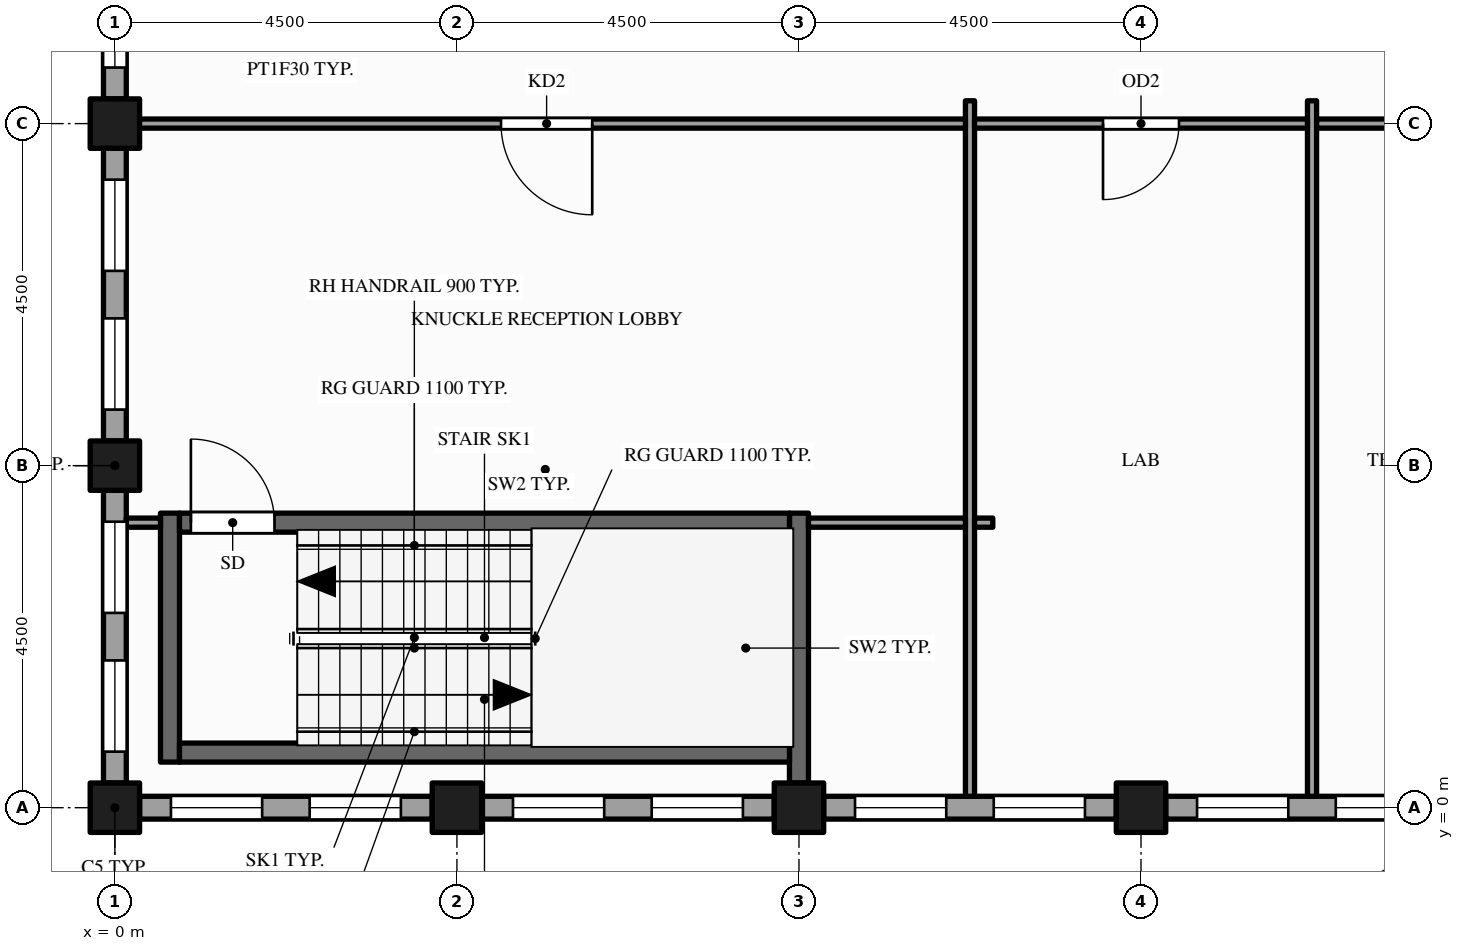
"""IFC4 building model, lengths in metres.
Left out: names, types, materials, properties, quantities, classifications, styles, units other than length and angle.
Written with IfcOpenShell. Run it as: python <this file> out.ifc"""

import sys

from ifc_helpers import new_model, si_unit, direction, frame, frame_2d, origin, origin_2d, place, context, subcontext, project, spatial, rectangle, hollow_rectangle, extrude, element, fill, save


model = new_model("IFC4")
c1 = context("Model", 3, precision=1e-05, world=origin(), true_north=direction((0.0, 1.0)))
c2 = subcontext(c1, "Body", "Model", "MODEL_VIEW")
j1 = project(units=[si_unit("LENGTHUNIT", "METRE"), si_unit("PLANEANGLEUNIT", "RADIAN")], contexts=[c1])
p1 = place(None, origin())
s1 = spatial("IfcSite", under=j1, at=p1, CompositionType="ELEMENT")
p2 = place(p1, origin())
s2 = spatial("IfcBuilding", under=s1, at=p2, CompositionType="ELEMENT")
p3 = place(p2, frame((0.0, 0.0, 293.0)))
s3 = spatial("IfcBuildingStorey", under=s2, at=p3, CompositionType="ELEMENT", Elevation=293.0)
for number, where, z_axis, x_axis in (
    (1, (0.0, 0.0, -0.15), (0.0, 0.0, 1.0), (1.0, 0.0, 0.0)),
    (2, (0.0, 4.5, -0.15), (0.0, 0.0, 1.0), (1.0, 0.0, 0.0)),
    (3, (0.0, 9.0, -0.15), (0.0, 0.0, 1.0), (1.0, 0.0, 0.0)),
    (4, (4.5, 0.0, -0.15), (0.0, 0.0, 1.0), (1.0, 0.0, 0.0)),
    (5, (9.0, 0.0, -0.15), (0.0, 0.0, 1.0), (1.0, 0.0, 0.0)),
    (6, (13.5, 0.0, -0.15), (0.0, 0.0, 1.0), (1.0, 0.0, 0.0)),
):
    element("IfcColumn", number, at=place(p3, frame(where, z_axis=z_axis, x_axis=x_axis)), inside=s3, PredefinedType="COLUMN", context=c2, shape_type="SweptSolid", body=[
        extrude(hollow_rectangle(XDim=0.65, YDim=0.65, WallThickness=0.032, at=origin_2d()), origin(), (0.0, 0.0, 1.0), 3.9),
    ])
p4 = place(p3, frame((0.0, 13.175, 0.0), z_axis=(0.0, 0.0, 1.0), x_axis=(0.0, -1.0, 0.0)))
e7 = element("IfcWall", 7, at=p4, inside=s3, PredefinedType="STANDARD", context=c2, shape_type="SweptSolid", body=[
    extrude(rectangle(XDim=3.85, YDim=0.3, at=frame_2d((1.925, 0.0))), origin(), (0.0, 0.0, 1.0), 3.062),
])
p5 = place(p4, frame((0.413, 0.0, 0.9)))
e8 = element("IfcOpeningElement", 8, at=p5, cuts=e7, PredefinedType="OPENING", context=c2, shape_type="SweptSolid", body=[
    extrude(rectangle(XDim=1.2, YDim=2.0, at=frame_2d((0.6, 1.0))), frame((0.0, 0.16, 0.0), z_axis=(0.0, -1.0, 0.0), x_axis=(1.0, 0.0, 0.0)), (0.0, 0.0, 1.0), 0.32),
])
p6 = place(p4, frame((2.238, 0.0, 0.9)))
e9 = element("IfcOpeningElement", 9, at=p6, cuts=e7, PredefinedType="OPENING", context=c2, shape_type="SweptSolid", body=[
    extrude(rectangle(XDim=1.2, YDim=2.0, at=frame_2d((0.6, 1.0))), frame((0.0, 0.16, 0.0), z_axis=(0.0, -1.0, 0.0), x_axis=(1.0, 0.0, 0.0)), (0.0, 0.0, 1.0), 0.32),
])
p7 = place(p3, frame((0.0, 8.675, 0.0), z_axis=(0.0, 0.0, 1.0), x_axis=(0.0, -1.0, 0.0)))
e10 = element("IfcWall", 10, at=p7, inside=s3, PredefinedType="STANDARD", context=c2, shape_type="SweptSolid", body=[
    extrude(rectangle(XDim=3.85, YDim=0.3, at=frame_2d((1.925, 0.0))), origin(), (0.0, 0.0, 1.0), 3.062),
])
p8 = place(p7, frame((0.413, 0.0, 0.9)))
e11 = element("IfcOpeningElement", 11, at=p8, cuts=e10, PredefinedType="OPENING", context=c2, shape_type="SweptSolid", body=[
    extrude(rectangle(XDim=1.2, YDim=2.0, at=frame_2d((0.6, 1.0))), frame((0.0, 0.16, 0.0), z_axis=(0.0, -1.0, 0.0), x_axis=(1.0, 0.0, 0.0)), (0.0, 0.0, 1.0), 0.32),
])
p9 = place(p7, frame((2.238, 0.0, 0.9)))
e12 = element("IfcOpeningElement", 12, at=p9, cuts=e10, PredefinedType="OPENING", context=c2, shape_type="SweptSolid", body=[
    extrude(rectangle(XDim=1.2, YDim=2.0, at=frame_2d((0.6, 1.0))), frame((0.0, 0.16, 0.0), z_axis=(0.0, -1.0, 0.0), x_axis=(1.0, 0.0, 0.0)), (0.0, 0.0, 1.0), 0.32),
])
p10 = place(p3, frame((0.0, 4.175, 0.0), z_axis=(0.0, 0.0, 1.0), x_axis=(0.0, -1.0, 0.0)))
e13 = element("IfcWall", 13, at=p10, inside=s3, PredefinedType="STANDARD", context=c2, shape_type="SweptSolid", body=[
    extrude(rectangle(XDim=3.85, YDim=0.3, at=frame_2d((1.925, 0.0))), origin(), (0.0, 0.0, 1.0), 3.062),
])
p11 = place(p10, frame((0.413, 0.0, 0.9)))
e14 = element("IfcOpeningElement", 14, at=p11, cuts=e13, PredefinedType="OPENING", context=c2, shape_type="SweptSolid", body=[
    extrude(rectangle(XDim=1.2, YDim=2.0, at=frame_2d((0.6, 1.0))), frame((0.0, 0.16, 0.0), z_axis=(0.0, -1.0, 0.0), x_axis=(1.0, 0.0, 0.0)), (0.0, 0.0, 1.0), 0.32),
])
p12 = place(p10, frame((2.238, 0.0, 0.9)))
e15 = element("IfcOpeningElement", 15, at=p12, cuts=e13, PredefinedType="OPENING", context=c2, shape_type="SweptSolid", body=[
    extrude(rectangle(XDim=1.2, YDim=2.0, at=frame_2d((0.6, 1.0))), frame((0.0, 0.16, 0.0), z_axis=(0.0, -1.0, 0.0), x_axis=(1.0, 0.0, 0.0)), (0.0, 0.0, 1.0), 0.32),
])
p13 = place(p3, frame((0.325, 0.0, 0.0), z_axis=(0.0, 0.0, 1.0), x_axis=(1.0, 0.0, 0.0)))
e16 = element("IfcWall", 16, at=p13, inside=s3, PredefinedType="STANDARD", context=c2, shape_type="SweptSolid", body=[
    extrude(rectangle(XDim=3.85, YDim=0.3, at=frame_2d((1.925, 0.0))), origin(), (0.0, 0.0, 1.0), 3.062),
])
p14 = place(p13, frame((0.413, 0.0, 0.9)))
e17 = element("IfcOpeningElement", 17, at=p14, cuts=e16, PredefinedType="OPENING", context=c2, shape_type="SweptSolid", body=[
    extrude(rectangle(XDim=1.2, YDim=2.0, at=frame_2d((0.6, 1.0))), frame((0.0, 0.16, 0.0), z_axis=(0.0, -1.0, 0.0), x_axis=(1.0, 0.0, 0.0)), (0.0, 0.0, 1.0), 0.32),
])
p15 = place(p13, frame((2.238, 0.0, 0.9)))
e18 = element("IfcOpeningElement", 18, at=p15, cuts=e16, PredefinedType="OPENING", context=c2, shape_type="SweptSolid", body=[
    extrude(rectangle(XDim=1.2, YDim=2.0, at=frame_2d((0.6, 1.0))), frame((0.0, 0.16, 0.0), z_axis=(0.0, -1.0, 0.0), x_axis=(1.0, 0.0, 0.0)), (0.0, 0.0, 1.0), 0.32),
])
p16 = place(p3, frame((4.825, 0.0, 0.0), z_axis=(0.0, 0.0, 1.0), x_axis=(1.0, 0.0, 0.0)))
e19 = element("IfcWall", 19, at=p16, inside=s3, PredefinedType="STANDARD", context=c2, shape_type="SweptSolid", body=[
    extrude(rectangle(XDim=3.85, YDim=0.3, at=frame_2d((1.925, 0.0))), origin(), (0.0, 0.0, 1.0), 3.062),
])
p17 = place(p16, frame((0.413, 0.0, 0.9)))
e20 = element("IfcOpeningElement", 20, at=p17, cuts=e19, PredefinedType="OPENING", context=c2, shape_type="SweptSolid", body=[
    extrude(rectangle(XDim=1.2, YDim=2.0, at=frame_2d((0.6, 1.0))), frame((0.0, 0.16, 0.0), z_axis=(0.0, -1.0, 0.0), x_axis=(1.0, 0.0, 0.0)), (0.0, 0.0, 1.0), 0.32),
])
p18 = place(p16, frame((2.238, 0.0, 0.9)))
e21 = element("IfcOpeningElement", 21, at=p18, cuts=e19, PredefinedType="OPENING", context=c2, shape_type="SweptSolid", body=[
    extrude(rectangle(XDim=1.2, YDim=2.0, at=frame_2d((0.6, 1.0))), frame((0.0, 0.16, 0.0), z_axis=(0.0, -1.0, 0.0), x_axis=(1.0, 0.0, 0.0)), (0.0, 0.0, 1.0), 0.32),
])
p19 = place(p3, frame((9.325, 0.0, 0.0), z_axis=(0.0, 0.0, 1.0), x_axis=(1.0, 0.0, 0.0)))
e22 = element("IfcWall", 22, at=p19, inside=s3, PredefinedType="STANDARD", context=c2, shape_type="SweptSolid", body=[
    extrude(rectangle(XDim=3.85, YDim=0.3, at=frame_2d((1.925, 0.0))), origin(), (0.0, 0.0, 1.0), 3.062),
])
p20 = place(p19, frame((0.413, 0.0, 0.9)))
e23 = element("IfcOpeningElement", 23, at=p20, cuts=e22, PredefinedType="OPENING", context=c2, shape_type="SweptSolid", body=[
    extrude(rectangle(XDim=1.2, YDim=2.0, at=frame_2d((0.6, 1.0))), frame((0.0, 0.16, 0.0), z_axis=(0.0, -1.0, 0.0), x_axis=(1.0, 0.0, 0.0)), (0.0, 0.0, 1.0), 0.32),
])
p21 = place(p19, frame((2.238, 0.0, 0.9)))
e24 = element("IfcOpeningElement", 24, at=p21, cuts=e22, PredefinedType="OPENING", context=c2, shape_type="SweptSolid", body=[
    extrude(rectangle(XDim=1.2, YDim=2.0, at=frame_2d((0.6, 1.0))), frame((0.0, 0.16, 0.0), z_axis=(0.0, -1.0, 0.0), x_axis=(1.0, 0.0, 0.0)), (0.0, 0.0, 1.0), 0.32),
])
p22 = place(p3, frame((13.825, 0.0, 0.0), z_axis=(0.0, 0.0, 1.0), x_axis=(1.0, 0.0, 0.0)))
e25 = element("IfcWall", 25, at=p22, inside=s3, PredefinedType="STANDARD", context=c2, shape_type="SweptSolid", body=[
    extrude(rectangle(XDim=3.85, YDim=0.3, at=frame_2d((1.925, 0.0))), origin(), (0.0, 0.0, 1.0), 3.062),
])
p23 = place(p22, frame((0.413, 0.0, 0.9)))
e26 = element("IfcOpeningElement", 26, at=p23, cuts=e25, PredefinedType="OPENING", context=c2, shape_type="SweptSolid", body=[
    extrude(rectangle(XDim=1.2, YDim=2.0, at=frame_2d((0.6, 1.0))), frame((0.0, 0.16, 0.0), z_axis=(0.0, -1.0, 0.0), x_axis=(1.0, 0.0, 0.0)), (0.0, 0.0, 1.0), 0.32),
])
p24 = place(p22, frame((2.238, 0.0, 0.9)))
e27 = element("IfcOpeningElement", 27, at=p24, cuts=e25, PredefinedType="OPENING", context=c2, shape_type="SweptSolid", body=[
    extrude(rectangle(XDim=1.2, YDim=2.0, at=frame_2d((0.6, 1.0))), frame((0.0, 0.16, 0.0), z_axis=(0.0, -1.0, 0.0), x_axis=(1.0, 0.0, 0.0)), (0.0, 0.0, 1.0), 0.32),
])
p25 = place(p3, frame((0.725, 0.6, 0.0), z_axis=(0.0, 0.0, 1.0), x_axis=(0.0, 1.0, 0.0)))
e28 = element("IfcWall", 28, at=p25, inside=s3, PredefinedType="SHEAR", context=c2, shape_type="SweptSolid", body=[
    extrude(rectangle(XDim=3.275, YDim=0.25, at=frame_2d((1.637, 0.0))), origin(), (0.0, 0.0, 1.0), 3.75),
])
p26 = place(p3, frame((9.0, 0.325, 0.0), z_axis=(0.0, 0.0, 1.0), x_axis=(0.0, 1.0, 0.0)))
e29 = element("IfcWall", 29, at=p26, inside=s3, PredefinedType="SHEAR", context=c2, shape_type="SweptSolid", body=[
    extrude(rectangle(XDim=3.55, YDim=0.25, at=frame_2d((1.775, 0.0))), origin(), (0.0, 0.0, 1.0), 3.75),
])
for number, where, z_axis, x_axis in (
    (30, (11.25, 0.15, 0.0), (0.0, 0.0, 1.0), (0.0, 1.0, 0.0)),
    (31, (15.75, 0.15, 0.0), (0.0, 0.0, 1.0), (0.0, 1.0, 0.0)),
):
    element("IfcWall", number, at=place(p3, frame(where, z_axis=z_axis, x_axis=x_axis)), inside=s3, PredefinedType="PARTITIONING", context=c2, shape_type="SweptSolid", body=[
        extrude(rectangle(XDim=9.15, YDim=0.12, at=frame_2d((4.575, 0.0))), origin(), (0.0, 0.0, 1.0), 2.77),
    ])
p27 = place(p3, frame((0.85, 0.725, 0.0), z_axis=(0.0, 0.0, 1.0), x_axis=(1.0, 0.0, 0.0)))
e32 = element("IfcWall", 32, at=p27, inside=s3, PredefinedType="SHEAR", context=c2, shape_type="SweptSolid", body=[
    extrude(rectangle(XDim=8.025, YDim=0.25, at=frame_2d((4.012, 0.0))), origin(), (0.0, 0.0, 1.0), 3.75),
])
p28 = place(p3, frame((0.15, 3.75, 0.0), z_axis=(0.0, 0.0, 1.0), x_axis=(1.0, 0.0, 0.0)))
e33 = element("IfcWall", 33, at=p28, inside=s3, PredefinedType="PARTITIONING", context=c2, shape_type="SweptSolid", body=[
    extrude(rectangle(XDim=0.45, YDim=0.12, at=frame_2d((0.225, 0.0))), origin(), (0.0, 0.0, 1.0), 3.75),
])
p29 = place(p3, frame((0.85, 3.75, 0.0), z_axis=(0.0, 0.0, 1.0), x_axis=(1.0, 0.0, 0.0)))
e34 = element("IfcWall", 34, at=p29, inside=s3, PredefinedType="SHEAR", context=c2, shape_type="SweptSolid", body=[
    extrude(rectangle(XDim=8.025, YDim=0.25, at=frame_2d((4.012, 0.0))), origin(), (0.0, 0.0, 1.0), 3.75),
])
p30 = place(p29, frame((0.15, 0.0, 0.0)))
e35 = element("IfcOpeningElement", 35, at=p30, cuts=e34, PredefinedType="OPENING", context=c2, shape_type="SweptSolid", body=[
    extrude(rectangle(XDim=1.1, YDim=2.1, at=frame_2d((0.55, 1.05))), frame((0.0, 0.135, 0.0), z_axis=(0.0, -1.0, 0.0), x_axis=(1.0, 0.0, 0.0)), (0.0, 0.0, 1.0), 0.27),
])
p31 = place(p3, frame((9.125, 3.75, 0.0), z_axis=(0.0, 0.0, 1.0), x_axis=(1.0, 0.0, 0.0)))
e36 = element("IfcWall", 36, at=p31, inside=s3, PredefinedType="PARTITIONING", context=c2, shape_type="SweptSolid", body=[
    extrude(rectangle(XDim=2.065, YDim=0.12, at=frame_2d((1.032, 0.0))), origin(), (0.0, 0.0, 1.0), 2.77),
])
p32 = place(p3, frame((11.31, 3.75, 0.0), z_axis=(0.0, 0.0, 1.0), x_axis=(1.0, 0.0, 0.0)))
e37 = element("IfcWall", 37, at=p32, inside=s3, PredefinedType="PARTITIONING", context=c2, shape_type="SweptSolid", body=[
    extrude(rectangle(XDim=0.24, YDim=0.12, at=frame_2d((0.12, 0.0))), origin(), (0.0, 0.0, 1.0), 2.77),
])
p33 = place(p3, frame((0.15, 9.0, 0.0), z_axis=(0.0, 0.0, 1.0), x_axis=(1.0, 0.0, 0.0)))
e38 = element("IfcWall", 38, at=p33, inside=s3, PredefinedType="PARTITIONING", context=c2, shape_type="SweptSolid", body=[
    extrude(rectangle(XDim=11.04, YDim=0.12, at=frame_2d((5.52, 0.0))), origin(), (0.0, 0.0, 1.0), 2.77),
])
p34 = place(p33, frame((4.93, 0.0, 0.0)))
e39 = element("IfcOpeningElement", 39, at=p34, cuts=e38, PredefinedType="OPENING", context=c2, shape_type="SweptSolid", body=[
    extrude(rectangle(XDim=1.2, YDim=2.1, at=frame_2d((0.6, 1.05))), frame((0.0, 0.07, 0.0), z_axis=(0.0, -1.0, 0.0), x_axis=(1.0, 0.0, 0.0)), (0.0, 0.0, 1.0), 0.14),
])
p35 = place(p3, frame((11.31, 9.0, 0.0), z_axis=(0.0, 0.0, 1.0), x_axis=(1.0, 0.0, 0.0)))
e40 = element("IfcWall", 40, at=p35, inside=s3, PredefinedType="PARTITIONING", context=c2, shape_type="SweptSolid", body=[
    extrude(rectangle(XDim=4.38, YDim=0.12, at=frame_2d((2.19, 0.0))), origin(), (0.0, 0.0, 1.0), 2.77),
])
p36 = place(p35, frame((1.69, 0.0, 0.0)))
e41 = element("IfcOpeningElement", 41, at=p36, cuts=e40, PredefinedType="OPENING", context=c2, shape_type="SweptSolid", body=[
    extrude(rectangle(XDim=1.0, YDim=2.1, at=frame_2d((0.5, 1.05))), frame((0.0, 0.07, 0.0), z_axis=(0.0, -1.0, 0.0), x_axis=(1.0, 0.0, 0.0)), (0.0, 0.0, 1.0), 0.14),
])
p37 = place(p3, frame((15.81, 9.0, 0.0), z_axis=(0.0, 0.0, 1.0), x_axis=(1.0, 0.0, 0.0)))
e42 = element("IfcWall", 42, at=p37, inside=s3, PredefinedType="PARTITIONING", context=c2, shape_type="SweptSolid", body=[
    extrude(rectangle(XDim=4.38, YDim=0.12, at=frame_2d((2.19, 0.0))), origin(), (0.0, 0.0, 1.0), 2.77),
])
p38 = place(p37, frame((1.69, 0.0, 0.0)))
e43 = element("IfcOpeningElement", 43, at=p38, cuts=e42, PredefinedType="OPENING", context=c2, shape_type="SweptSolid", body=[
    extrude(rectangle(XDim=1.0, YDim=2.1, at=frame_2d((0.5, 1.05))), frame((0.0, 0.07, 0.0), z_axis=(0.0, -1.0, 0.0), x_axis=(1.0, 0.0, 0.0)), (0.0, 0.0, 1.0), 0.14),
])
p39 = place(p6, origin())
e44 = element("IfcWindow", 44, at=p39, inside=s3, PartitioningType="SINGLE_PANEL", PredefinedType="WINDOW", context=c2, shape_type="SweptSolid", body=[
    extrude(rectangle(XDim=1.2, YDim=2.0, at=frame_2d((0.6, 1.0))), frame((0.0, 0.03, 0.0), z_axis=(0.0, -1.0, 0.0), x_axis=(1.0, 0.0, 0.0)), (0.0, 0.0, 1.0), 0.06),
])
fill(e9, e44)
p40 = place(p8, origin())
e45 = element("IfcWindow", 45, at=p40, inside=s3, PartitioningType="SINGLE_PANEL", PredefinedType="WINDOW", context=c2, shape_type="SweptSolid", body=[
    extrude(rectangle(XDim=1.2, YDim=2.0, at=frame_2d((0.6, 1.0))), frame((0.0, 0.03, 0.0), z_axis=(0.0, -1.0, 0.0), x_axis=(1.0, 0.0, 0.0)), (0.0, 0.0, 1.0), 0.06),
])
fill(e11, e45)
p41 = place(p9, origin())
e46 = element("IfcWindow", 46, at=p41, inside=s3, PartitioningType="SINGLE_PANEL", PredefinedType="WINDOW", context=c2, shape_type="SweptSolid", body=[
    extrude(rectangle(XDim=1.2, YDim=2.0, at=frame_2d((0.6, 1.0))), frame((0.0, 0.03, 0.0), z_axis=(0.0, -1.0, 0.0), x_axis=(1.0, 0.0, 0.0)), (0.0, 0.0, 1.0), 0.06),
])
fill(e12, e46)
p42 = place(p11, origin())
e47 = element("IfcWindow", 47, at=p42, inside=s3, PartitioningType="SINGLE_PANEL", PredefinedType="WINDOW", context=c2, shape_type="SweptSolid", body=[
    extrude(rectangle(XDim=1.2, YDim=2.0, at=frame_2d((0.6, 1.0))), frame((0.0, 0.03, 0.0), z_axis=(0.0, -1.0, 0.0), x_axis=(1.0, 0.0, 0.0)), (0.0, 0.0, 1.0), 0.06),
])
fill(e14, e47)
p43 = place(p12, origin())
e48 = element("IfcWindow", 48, at=p43, inside=s3, PartitioningType="SINGLE_PANEL", PredefinedType="WINDOW", context=c2, shape_type="SweptSolid", body=[
    extrude(rectangle(XDim=1.2, YDim=2.0, at=frame_2d((0.6, 1.0))), frame((0.0, 0.03, 0.0), z_axis=(0.0, -1.0, 0.0), x_axis=(1.0, 0.0, 0.0)), (0.0, 0.0, 1.0), 0.06),
])
fill(e15, e48)
p44 = place(p14, origin())
e49 = element("IfcWindow", 49, at=p44, inside=s3, PartitioningType="SINGLE_PANEL", PredefinedType="WINDOW", context=c2, shape_type="SweptSolid", body=[
    extrude(rectangle(XDim=1.2, YDim=2.0, at=frame_2d((0.6, 1.0))), frame((0.0, 0.03, 0.0), z_axis=(0.0, -1.0, 0.0), x_axis=(1.0, 0.0, 0.0)), (0.0, 0.0, 1.0), 0.06),
])
fill(e17, e49)
p45 = place(p15, origin())
e50 = element("IfcWindow", 50, at=p45, inside=s3, PartitioningType="SINGLE_PANEL", PredefinedType="WINDOW", context=c2, shape_type="SweptSolid", body=[
    extrude(rectangle(XDim=1.2, YDim=2.0, at=frame_2d((0.6, 1.0))), frame((0.0, 0.03, 0.0), z_axis=(0.0, -1.0, 0.0), x_axis=(1.0, 0.0, 0.0)), (0.0, 0.0, 1.0), 0.06),
])
fill(e18, e50)
p46 = place(p17, origin())
e51 = element("IfcWindow", 51, at=p46, inside=s3, PartitioningType="SINGLE_PANEL", PredefinedType="WINDOW", context=c2, shape_type="SweptSolid", body=[
    extrude(rectangle(XDim=1.2, YDim=2.0, at=frame_2d((0.6, 1.0))), frame((0.0, 0.03, 0.0), z_axis=(0.0, -1.0, 0.0), x_axis=(1.0, 0.0, 0.0)), (0.0, 0.0, 1.0), 0.06),
])
fill(e20, e51)
p47 = place(p18, origin())
e52 = element("IfcWindow", 52, at=p47, inside=s3, PartitioningType="SINGLE_PANEL", PredefinedType="WINDOW", context=c2, shape_type="SweptSolid", body=[
    extrude(rectangle(XDim=1.2, YDim=2.0, at=frame_2d((0.6, 1.0))), frame((0.0, 0.03, 0.0), z_axis=(0.0, -1.0, 0.0), x_axis=(1.0, 0.0, 0.0)), (0.0, 0.0, 1.0), 0.06),
])
fill(e21, e52)
p48 = place(p20, origin())
e53 = element("IfcWindow", 53, at=p48, inside=s3, PartitioningType="SINGLE_PANEL", PredefinedType="WINDOW", context=c2, shape_type="SweptSolid", body=[
    extrude(rectangle(XDim=1.2, YDim=2.0, at=frame_2d((0.6, 1.0))), frame((0.0, 0.03, 0.0), z_axis=(0.0, -1.0, 0.0), x_axis=(1.0, 0.0, 0.0)), (0.0, 0.0, 1.0), 0.06),
])
fill(e23, e53)
p49 = place(p21, origin())
e54 = element("IfcWindow", 54, at=p49, inside=s3, PartitioningType="SINGLE_PANEL", PredefinedType="WINDOW", context=c2, shape_type="SweptSolid", body=[
    extrude(rectangle(XDim=1.2, YDim=2.0, at=frame_2d((0.6, 1.0))), frame((0.0, 0.03, 0.0), z_axis=(0.0, -1.0, 0.0), x_axis=(1.0, 0.0, 0.0)), (0.0, 0.0, 1.0), 0.06),
])
fill(e24, e54)
p50 = place(p23, origin())
e55 = element("IfcWindow", 55, at=p50, inside=s3, PartitioningType="SINGLE_PANEL", PredefinedType="WINDOW", context=c2, shape_type="SweptSolid", body=[
    extrude(rectangle(XDim=1.2, YDim=2.0, at=frame_2d((0.6, 1.0))), frame((0.0, 0.03, 0.0), z_axis=(0.0, -1.0, 0.0), x_axis=(1.0, 0.0, 0.0)), (0.0, 0.0, 1.0), 0.06),
])
fill(e26, e55)
p51 = place(p24, origin())
e56 = element("IfcWindow", 56, at=p51, inside=s3, PartitioningType="SINGLE_PANEL", PredefinedType="WINDOW", context=c2, shape_type="SweptSolid", body=[
    extrude(rectangle(XDim=1.2, YDim=2.0, at=frame_2d((0.6, 1.0))), frame((0.0, 0.03, 0.0), z_axis=(0.0, -1.0, 0.0), x_axis=(1.0, 0.0, 0.0)), (0.0, 0.0, 1.0), 0.06),
])
fill(e27, e56)
p52 = place(p30, origin())
e57 = element("IfcDoor", 57, at=p52, inside=s3, OperationType="SINGLE_SWING_LEFT", PredefinedType="DOOR", context=c2, shape_type="SweptSolid", body=[
    extrude(rectangle(XDim=1.1, YDim=2.1, at=frame_2d((0.55, 1.05))), frame((0.0, 0.025, 0.0), z_axis=(0.0, -1.0, 0.0), x_axis=(1.0, 0.0, 0.0)), (0.0, 0.0, 1.0), 0.05),
])
fill(e35, e57)
p53 = place(p34, origin())
e58 = element("IfcDoor", 58, at=p53, inside=s3, OperationType="SINGLE_SWING_RIGHT", PredefinedType="DOOR", context=c2, shape_type="SweptSolid", body=[
    extrude(rectangle(XDim=1.2, YDim=2.1, at=frame_2d((0.6, 1.05))), frame((0.0, 0.025, 0.0), z_axis=(0.0, -1.0, 0.0), x_axis=(1.0, 0.0, 0.0)), (0.0, 0.0, 1.0), 0.05),
])
fill(e39, e58)
p54 = place(p36, origin())
e59 = element("IfcDoor", 59, at=p54, inside=s3, OperationType="SINGLE_SWING_LEFT", PredefinedType="DOOR", context=c2, shape_type="SweptSolid", body=[
    extrude(rectangle(XDim=1.0, YDim=2.1, at=frame_2d((0.5, 1.05))), frame((0.0, 0.025, 0.0), z_axis=(0.0, -1.0, 0.0), x_axis=(1.0, 0.0, 0.0)), (0.0, 0.0, 1.0), 0.05),
])
fill(e41, e59)
save(model, sys.argv[1])
